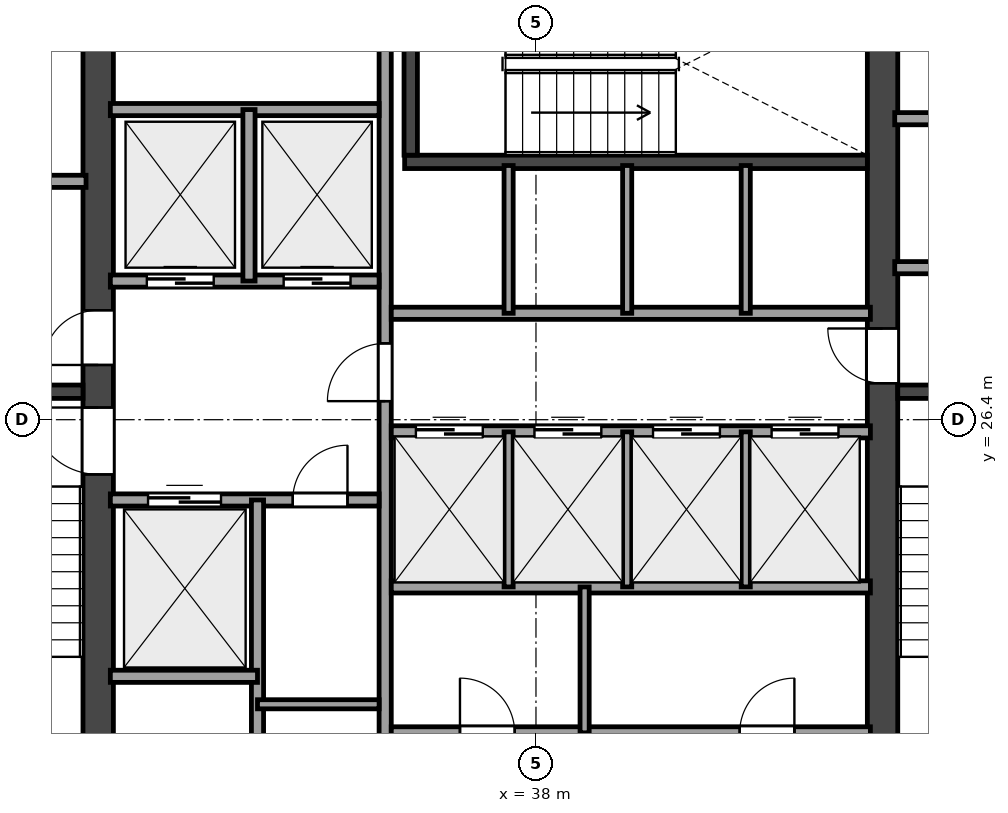
"""IFC4 building model, lengths in metres.
Left out: names, types, materials, properties, quantities, classifications, styles, units other than length and angle.
Written with IfcOpenShell. Run it as: python <this file> out.ifc"""

import sys

from ifc_helpers import new_model, si_unit, direction, frame, frame_2d, origin, place, context, subcontext, project, spatial, rectangle, extrude, element, fill, save


model = new_model("IFC4")
c1 = context("Model", 3, precision=1e-05, world=origin(), true_north=direction((0.0, 1.0)))
c2 = subcontext(c1, "Body", "Model", "MODEL_VIEW")
j1 = project(units=[si_unit("LENGTHUNIT", "METRE"), si_unit("PLANEANGLEUNIT", "RADIAN")], contexts=[c1])
p1 = place(None, origin())
s1 = spatial("IfcSite", under=j1, at=p1, CompositionType="ELEMENT")
p2 = place(p1, origin())
s2 = spatial("IfcBuilding", under=s1, at=p2, CompositionType="ELEMENT")
p3 = place(p2, frame((0.0, 0.0, 180.6)))
s3 = spatial("IfcBuildingStorey", under=s2, at=p3, CompositionType="ELEMENT", Elevation=180.6)
p4 = place(p3, frame((30.8, 18.875, 0.0), z_axis=(0.0, 0.0, 1.0), x_axis=(0.0, 1.0, 0.0)))
e1 = element("IfcWall", 1, at=p4, inside=s3, PredefinedType="SHEAR", context=c2, shape_type="SweptSolid", body=[
    extrude(rectangle(XDim=15.05, YDim=0.5, at=frame_2d((7.525, 0.0))), origin(), (0.0, 0.0, 1.0), 3.32),
])
p5 = place(p4, frame((6.625, 0.0, 0.0)))
e2 = element("IfcOpeningElement", 2, at=p5, cuts=e1, PredefinedType="OPENING", context=c2, shape_type="SweptSolid", body=[
    extrude(rectangle(XDim=1.1, YDim=2.15, at=frame_2d((0.55, 1.075))), frame((0.0, 0.26, 0.0), z_axis=(0.0, -1.0, 0.0), x_axis=(1.0, 0.0, 0.0)), (0.0, 0.0, 1.0), 0.52),
])
p6 = place(p4, frame((8.425, 0.0, 0.0)))
e3 = element("IfcOpeningElement", 3, at=p6, cuts=e1, PredefinedType="OPENING", context=c2, shape_type="SweptSolid", body=[
    extrude(rectangle(XDim=0.9, YDim=2.1, at=frame_2d((0.45, 1.05))), frame((0.0, 0.26, 0.0), z_axis=(0.0, -1.0, 0.0), x_axis=(1.0, 0.0, 0.0)), (0.0, 0.0, 1.0), 0.52),
])
p7 = place(p3, frame((43.7, 18.875, 0.0), z_axis=(0.0, 0.0, 1.0), x_axis=(0.0, 1.0, 0.0)))
e4 = element("IfcWall", 4, at=p7, inside=s3, PredefinedType="SHEAR", context=c2, shape_type="SweptSolid", body=[
    extrude(rectangle(XDim=15.05, YDim=0.5, at=frame_2d((7.525, 0.0))), origin(), (0.0, 0.0, 1.0), 3.32),
])
p8 = place(p7, frame((8.125, 0.0, 0.0)))
e5 = element("IfcOpeningElement", 5, at=p8, cuts=e4, PredefinedType="OPENING", context=c2, shape_type="SweptSolid", body=[
    extrude(rectangle(XDim=0.9, YDim=2.1, at=frame_2d((0.45, 1.05))), frame((0.0, 0.26, 0.0), z_axis=(0.0, -1.0, 0.0), x_axis=(1.0, 0.0, 0.0)), (0.0, 0.0, 1.0), 0.52),
])
p9 = place(p3, frame((27.075, 26.86, 0.0), z_axis=(0.0, 0.0, 1.0), x_axis=(1.0, 0.0, 0.0)))
e6 = element("IfcWall", 6, at=p9, inside=s3, PredefinedType="SHEAR", context=c2, shape_type="SweptSolid", body=[
    extrude(rectangle(XDim=3.475, YDim=0.22, at=frame_2d((1.738, 0.0))), origin(), (0.0, 0.0, 1.0), 3.32),
])
p10 = place(p3, frame((43.95, 26.86, 0.0), z_axis=(0.0, 0.0, 1.0), x_axis=(1.0, 0.0, 0.0)))
e7 = element("IfcWall", 7, at=p10, inside=s3, PredefinedType="SHEAR", context=c2, shape_type="SweptSolid", body=[
    extrude(rectangle(XDim=3.375, YDim=0.22, at=frame_2d((1.688, 0.0))), origin(), (0.0, 0.0, 1.0), 3.32),
])
p11 = place(p3, frame((35.84, 30.64, 0.0), z_axis=(0.0, 0.0, 1.0), x_axis=(1.0, 0.0, 0.0)))
e8 = element("IfcWall", 8, at=p11, inside=s3, PredefinedType="SHEAR", context=c2, shape_type="SweptSolid", body=[
    extrude(rectangle(XDim=7.61, YDim=0.22, at=frame_2d((3.805, 0.0))), origin(), (0.0, 0.0, 1.0), 3.32),
])
p12 = place(p3, frame((35.94, 30.75, 0.0), z_axis=(0.0, 0.0, 1.0), x_axis=(0.0, 1.0, 0.0)))
e9 = element("IfcWall", 9, at=p12, inside=s3, PredefinedType="SHEAR", context=c2, shape_type="SweptSolid", body=[
    extrude(rectangle(XDim=3.175, YDim=0.22, at=frame_2d((1.587, 0.0))), origin(), (0.0, 0.0, 1.0), 3.32),
])
p13 = place(p3, frame((27.15, 30.32, 0.0), z_axis=(0.0, 0.0, 1.0), x_axis=(1.0, 0.0, 0.0)))
e10 = element("IfcWall", 10, at=p13, inside=s3, PredefinedType="SOLIDWALL", context=c2, shape_type="SweptSolid", body=[
    extrude(rectangle(XDim=3.45, YDim=0.2, at=frame_2d((1.725, 0.0))), origin(), (0.0, 0.0, 1.0), 3.32),
])
p14 = place(p3, frame((43.9, 28.9, 0.0), z_axis=(0.0, 0.0, 1.0), x_axis=(1.0, 0.0, 0.0)))
e11 = element("IfcWall", 11, at=p14, inside=s3, PredefinedType="SOLIDWALL", context=c2, shape_type="SweptSolid", body=[
    extrude(rectangle(XDim=3.35, YDim=0.2, at=frame_2d((1.675, 0.0))), origin(), (0.0, 0.0, 1.0), 3.32),
])
p15 = place(p14, frame((1.15, 0.0, 0.0)))
e12 = element("IfcOpeningElement", 12, at=p15, cuts=e11, PredefinedType="OPENING", context=c2, shape_type="SweptSolid", body=[
    extrude(rectangle(XDim=0.9, YDim=2.1, at=frame_2d((0.45, 1.05))), frame((0.0, 0.11, 0.0), z_axis=(0.0, -1.0, 0.0), x_axis=(1.0, 0.0, 0.0)), (0.0, 0.0, 1.0), 0.22),
])
p16 = place(p3, frame((43.9, 31.35, 0.0), z_axis=(0.0, 0.0, 1.0), x_axis=(1.0, 0.0, 0.0)))
e13 = element("IfcWall", 13, at=p16, inside=s3, PredefinedType="SOLIDWALL", context=c2, shape_type="SweptSolid", body=[
    extrude(rectangle(XDim=3.35, YDim=0.2, at=frame_2d((1.675, 0.0))), origin(), (0.0, 0.0, 1.0), 2.949),
])
p17 = place(p3, frame((35.52, 18.95, 0.0), z_axis=(0.0, 0.0, 1.0), x_axis=(0.0, 1.0, 0.0)))
e14 = element("IfcWall", 14, at=p17, inside=s3, PredefinedType="SOLIDWALL", context=c2, shape_type="SweptSolid", body=[
    extrude(rectangle(XDim=14.9, YDim=0.2, at=frame_2d((7.45, 0.0))), origin(), (0.0, 0.0, 1.0), 2.841),
])
p18 = place(p17, frame((7.755, 0.0, 0.0)))
e15 = element("IfcOpeningElement", 15, at=p18, cuts=e14, PredefinedType="OPENING", context=c2, shape_type="SweptSolid", body=[
    extrude(rectangle(XDim=0.95, YDim=2.15, at=frame_2d((0.475, 1.075))), frame((0.0, 0.11, 0.0), z_axis=(0.0, -1.0, 0.0), x_axis=(1.0, 0.0, 0.0)), (0.0, 0.0, 1.0), 0.22),
])
p19 = place(p17, frame((0.6, 0.0, 0.0)))
e16 = element("IfcOpeningElement", 16, at=p19, cuts=e14, PredefinedType="OPENING", context=c2, shape_type="SweptSolid", body=[
    extrude(rectangle(XDim=0.9, YDim=2.1, at=frame_2d((0.45, 1.05))), frame((0.0, 0.11, 0.0), z_axis=(0.0, -1.0, 0.0), x_axis=(1.0, 0.0, 0.0)), (0.0, 0.0, 1.0), 0.22),
])
p20 = place(p3, frame((31.0, 28.68, 0.0), z_axis=(0.0, 0.0, 1.0), x_axis=(1.0, 0.0, 0.0)))
e17 = element("IfcWall", 17, at=p20, inside=s3, PredefinedType="SOLIDWALL", context=c2, shape_type="SweptSolid", body=[
    extrude(rectangle(XDim=4.42, YDim=0.2, at=frame_2d((2.21, 0.0))), origin(), (0.0, 0.0, 1.0), 3.32),
])
p21 = place(p20, frame((0.6, 0.0, 0.0)))
e18 = element("IfcOpeningElement", 18, at=p21, cuts=e17, PredefinedType="OPENING", context=c2, shape_type="SweptSolid", body=[
    extrude(rectangle(XDim=1.1, YDim=2.15, at=frame_2d((0.55, 1.075))), frame((0.0, 0.11, 0.0), z_axis=(0.0, -1.0, 0.0), x_axis=(1.0, 0.0, 0.0)), (0.0, 0.0, 1.0), 0.22),
])
p22 = place(p20, frame((2.85, 0.0, 0.0)))
e19 = element("IfcOpeningElement", 19, at=p22, cuts=e17, PredefinedType="OPENING", context=c2, shape_type="SweptSolid", body=[
    extrude(rectangle(XDim=1.1, YDim=2.15, at=frame_2d((0.55, 1.075))), frame((0.0, 0.11, 0.0), z_axis=(0.0, -1.0, 0.0), x_axis=(1.0, 0.0, 0.0)), (0.0, 0.0, 1.0), 0.22),
])
p23 = place(p3, frame((31.0, 31.5, 0.0), z_axis=(0.0, 0.0, 1.0), x_axis=(1.0, 0.0, 0.0)))
e20 = element("IfcWall", 20, at=p23, inside=s3, PredefinedType="SOLIDWALL", context=c2, shape_type="SweptSolid", body=[
    extrude(rectangle(XDim=4.42, YDim=0.2, at=frame_2d((2.21, 0.0))), origin(), (0.0, 0.0, 1.0), 3.32),
])
p24 = place(p3, frame((33.28, 28.68, 0.0), z_axis=(0.0, 0.0, 1.0), x_axis=(0.0, 1.0, 0.0)))
e21 = element("IfcWall", 21, at=p24, inside=s3, PredefinedType="SOLIDWALL", context=c2, shape_type="SweptSolid", body=[
    extrude(rectangle(XDim=2.82, YDim=0.2, at=frame_2d((1.41, 0.0))), origin(), (0.0, 0.0, 1.0), 3.32),
])
p25 = place(p3, frame((31.0, 25.08, 0.0), z_axis=(0.0, 0.0, 1.0), x_axis=(1.0, 0.0, 0.0)))
e22 = element("IfcWall", 22, at=p25, inside=s3, PredefinedType="SOLIDWALL", context=c2, shape_type="SweptSolid", body=[
    extrude(rectangle(XDim=4.42, YDim=0.2, at=frame_2d((2.21, 0.0))), origin(), (0.0, 0.0, 1.0), 3.32),
])
p26 = place(p25, frame((3.0, 0.0, 0.0)))
e23 = element("IfcOpeningElement", 23, at=p26, cuts=e22, PredefinedType="OPENING", context=c2, shape_type="SweptSolid", body=[
    extrude(rectangle(XDim=0.9, YDim=2.1, at=frame_2d((0.45, 1.05))), frame((0.0, 0.11, 0.0), z_axis=(0.0, -1.0, 0.0), x_axis=(1.0, 0.0, 0.0)), (0.0, 0.0, 1.0), 0.22),
])
p27 = place(p25, frame((0.62, 0.0, 0.0)))
e24 = element("IfcOpeningElement", 24, at=p27, cuts=e22, PredefinedType="OPENING", context=c2, shape_type="SweptSolid", body=[
    extrude(rectangle(XDim=1.2, YDim=2.15, at=frame_2d((0.6, 1.075))), frame((0.0, 0.11, 0.0), z_axis=(0.0, -1.0, 0.0), x_axis=(1.0, 0.0, 0.0)), (0.0, 0.0, 1.0), 0.22),
])
p28 = place(p3, frame((33.42, 18.95, 0.0), z_axis=(0.0, 0.0, 1.0), x_axis=(0.0, 1.0, 0.0)))
e25 = element("IfcWall", 25, at=p28, inside=s3, PredefinedType="SOLIDWALL", context=c2, shape_type="SweptSolid", body=[
    extrude(rectangle(XDim=6.13, YDim=0.2, at=frame_2d((3.065, 0.0))), origin(), (0.0, 0.0, 1.0), 2.841),
])
p29 = place(p3, frame((31.0, 22.18, 0.0), z_axis=(0.0, 0.0, 1.0), x_axis=(1.0, 0.0, 0.0)))
e26 = element("IfcWall", 26, at=p29, inside=s3, PredefinedType="SOLIDWALL", context=c2, shape_type="SweptSolid", body=[
    extrude(rectangle(XDim=2.42, YDim=0.2, at=frame_2d((1.21, 0.0))), origin(), (0.0, 0.0, 1.0), 3.32),
])
p30 = place(p3, frame((33.42, 21.72, 0.0), z_axis=(0.0, 0.0, 1.0), x_axis=(1.0, 0.0, 0.0)))
e27 = element("IfcWall", 27, at=p30, inside=s3, PredefinedType="PARTITIONING", context=c2, shape_type="SweptSolid", body=[
    extrude(rectangle(XDim=2.0, YDim=0.15, at=frame_2d((1.0, 0.0))), origin(), (0.0, 0.0, 1.0), 3.32),
])
p31 = place(p3, frame((35.62, 28.15, 0.0), z_axis=(0.0, 0.0, 1.0), x_axis=(1.0, 0.0, 0.0)))
e28 = element("IfcWall", 28, at=p31, inside=s3, PredefinedType="SOLIDWALL", context=c2, shape_type="SweptSolid", body=[
    extrude(rectangle(XDim=7.88, YDim=0.2, at=frame_2d((3.94, 0.0))), origin(), (0.0, 0.0, 1.0), 3.32),
])
p32 = place(p3, frame((35.62, 26.2, 0.0), z_axis=(0.0, 0.0, 1.0), x_axis=(1.0, 0.0, 0.0)))
e29 = element("IfcWall", 29, at=p32, inside=s3, PredefinedType="SOLIDWALL", context=c2, shape_type="SweptSolid", body=[
    extrude(rectangle(XDim=7.88, YDim=0.2, at=frame_2d((3.94, 0.0))), origin(), (0.0, 0.0, 1.0), 3.32),
])
p33 = place(p32, frame((0.405, 0.0, 0.0)))
e30 = element("IfcOpeningElement", 30, at=p33, cuts=e29, PredefinedType="OPENING", context=c2, shape_type="SweptSolid", body=[
    extrude(rectangle(XDim=1.1, YDim=2.15, at=frame_2d((0.55, 1.075))), frame((0.0, 0.11, 0.0), z_axis=(0.0, -1.0, 0.0), x_axis=(1.0, 0.0, 0.0)), (0.0, 0.0, 1.0), 0.22),
])
p34 = place(p32, frame((2.355, 0.0, 0.0)))
e31 = element("IfcOpeningElement", 31, at=p34, cuts=e29, PredefinedType="OPENING", context=c2, shape_type="SweptSolid", body=[
    extrude(rectangle(XDim=1.1, YDim=2.15, at=frame_2d((0.55, 1.075))), frame((0.0, 0.11, 0.0), z_axis=(0.0, -1.0, 0.0), x_axis=(1.0, 0.0, 0.0)), (0.0, 0.0, 1.0), 0.22),
])
p35 = place(p32, frame((4.305, 0.0, 0.0)))
e32 = element("IfcOpeningElement", 32, at=p35, cuts=e29, PredefinedType="OPENING", context=c2, shape_type="SweptSolid", body=[
    extrude(rectangle(XDim=1.1, YDim=2.15, at=frame_2d((0.55, 1.075))), frame((0.0, 0.11, 0.0), z_axis=(0.0, -1.0, 0.0), x_axis=(1.0, 0.0, 0.0)), (0.0, 0.0, 1.0), 0.22),
])
p36 = place(p32, frame((6.255, 0.0, 0.0)))
e33 = element("IfcOpeningElement", 33, at=p36, cuts=e29, PredefinedType="OPENING", context=c2, shape_type="SweptSolid", body=[
    extrude(rectangle(XDim=1.1, YDim=2.15, at=frame_2d((0.55, 1.075))), frame((0.0, 0.11, 0.0), z_axis=(0.0, -1.0, 0.0), x_axis=(1.0, 0.0, 0.0)), (0.0, 0.0, 1.0), 0.22),
])
p37 = place(p3, frame((35.62, 23.65, 0.0), z_axis=(0.0, 0.0, 1.0), x_axis=(1.0, 0.0, 0.0)))
e34 = element("IfcWall", 34, at=p37, inside=s3, PredefinedType="SOLIDWALL", context=c2, shape_type="SweptSolid", body=[
    extrude(rectangle(XDim=7.88, YDim=0.2, at=frame_2d((3.94, 0.0))), origin(), (0.0, 0.0, 1.0), 2.841),
])
p38 = place(p3, frame((35.62, 21.25, 0.0), z_axis=(0.0, 0.0, 1.0), x_axis=(1.0, 0.0, 0.0)))
e35 = element("IfcWall", 35, at=p38, inside=s3, PredefinedType="SOLIDWALL", context=c2, shape_type="SweptSolid", body=[
    extrude(rectangle(XDim=7.88, YDim=0.2, at=frame_2d((3.94, 0.0))), origin(), (0.0, 0.0, 1.0), 3.32),
])
p39 = place(p38, frame((1.13, 0.0, 0.0)))
e36 = element("IfcOpeningElement", 36, at=p39, cuts=e35, PredefinedType="OPENING", context=c2, shape_type="SweptSolid", body=[
    extrude(rectangle(XDim=0.9, YDim=2.1, at=frame_2d((0.45, 1.05))), frame((0.0, 0.11, 0.0), z_axis=(0.0, -1.0, 0.0), x_axis=(1.0, 0.0, 0.0)), (0.0, 0.0, 1.0), 0.22),
])
p40 = place(p38, frame((5.73, 0.0, 0.0)))
e37 = element("IfcOpeningElement", 37, at=p40, cuts=e35, PredefinedType="OPENING", context=c2, shape_type="SweptSolid", body=[
    extrude(rectangle(XDim=0.9, YDim=2.1, at=frame_2d((0.45, 1.05))), frame((0.0, 0.11, 0.0), z_axis=(0.0, -1.0, 0.0), x_axis=(1.0, 0.0, 0.0)), (0.0, 0.0, 1.0), 0.22),
])
for number, where, z_axis, x_axis in (
    (38, (37.55, 28.15, 0.0), (0.0, 0.0, 1.0), (0.0, 1.0, 0.0)),
    (39, (39.5, 28.15, 0.0), (0.0, 0.0, 1.0), (0.0, 1.0, 0.0)),
    (40, (41.45, 28.15, 0.0), (0.0, 0.0, 1.0), (0.0, 1.0, 0.0)),
):
    element("IfcWall", number, at=place(p3, frame(where, z_axis=z_axis, x_axis=x_axis)), inside=s3, PredefinedType="PARTITIONING", context=c2, shape_type="SweptSolid", body=[
        extrude(rectangle(XDim=2.43, YDim=0.15, at=frame_2d((1.215, 0.0))), origin(), (0.0, 0.0, 1.0), 3.32),
    ])
for number, where, z_axis, x_axis in (
    (41, (37.55, 23.65, 0.0), (0.0, 0.0, 1.0), (0.0, 1.0, 0.0)),
    (42, (39.5, 23.65, 0.0), (0.0, 0.0, 1.0), (0.0, 1.0, 0.0)),
    (43, (41.45, 23.65, 0.0), (0.0, 0.0, 1.0), (0.0, 1.0, 0.0)),
):
    element("IfcWall", number, at=place(p3, frame(where, z_axis=z_axis, x_axis=x_axis)), inside=s3, PredefinedType="PARTITIONING", context=c2, shape_type="SweptSolid", body=[
        extrude(rectangle(XDim=2.55, YDim=0.15, at=frame_2d((1.275, 0.0))), origin(), (0.0, 0.0, 1.0), 2.841),
    ])
p41 = place(p3, frame((38.8, 21.25, 0.0), z_axis=(0.0, 0.0, 1.0), x_axis=(0.0, 1.0, 0.0)))
e44 = element("IfcWall", 44, at=p41, inside=s3, PredefinedType="PARTITIONING", context=c2, shape_type="SweptSolid", body=[
    extrude(rectangle(XDim=2.4, YDim=0.15, at=frame_2d((1.2, 0.0))), origin(), (0.0, 0.0, 1.0), 2.841),
])
p42 = place(p5, origin())
e45 = element("IfcDoor", 45, at=p42, inside=s3, OperationType="SINGLE_SWING_RIGHT", PredefinedType="DOOR", context=c2, shape_type="SweptSolid", body=[
    extrude(rectangle(XDim=1.1, YDim=2.15, at=frame_2d((0.55, 1.075))), frame((0.0, 0.025, 0.0), z_axis=(0.0, -1.0, 0.0), x_axis=(1.0, 0.0, 0.0)), (0.0, 0.0, 1.0), 0.05),
])
fill(e2, e45)
p43 = place(p18, origin())
e46 = element("IfcDoor", 46, at=p43, inside=s3, OperationType="SINGLE_SWING_LEFT", PredefinedType="DOOR", context=c2, shape_type="SweptSolid", body=[
    extrude(rectangle(XDim=0.95, YDim=2.15, at=frame_2d((0.475, 1.075))), frame((0.0, 0.025, 0.0), z_axis=(0.0, -1.0, 0.0), x_axis=(1.0, 0.0, 0.0)), (0.0, 0.0, 1.0), 0.05),
])
fill(e15, e46)
p44 = place(p8, origin())
e47 = element("IfcDoor", 47, at=p44, inside=s3, OperationType="SINGLE_SWING_RIGHT", PredefinedType="DOOR", context=c2, shape_type="SweptSolid", body=[
    extrude(rectangle(XDim=0.9, YDim=2.1, at=frame_2d((0.45, 1.05))), frame((0.0, 0.025, 0.0), z_axis=(0.0, -1.0, 0.0), x_axis=(1.0, 0.0, 0.0)), (0.0, 0.0, 1.0), 0.05),
])
fill(e5, e47)
p45 = place(p6, origin())
e48 = element("IfcDoor", 48, at=p45, inside=s3, OperationType="SINGLE_SWING_LEFT", PredefinedType="DOOR", context=c2, shape_type="SweptSolid", body=[
    extrude(rectangle(XDim=0.9, YDim=2.1, at=frame_2d((0.45, 1.05))), frame((0.0, 0.025, 0.0), z_axis=(0.0, -1.0, 0.0), x_axis=(1.0, 0.0, 0.0)), (0.0, 0.0, 1.0), 0.05),
])
fill(e3, e48)
p46 = place(p26, origin())
e49 = element("IfcDoor", 49, at=p46, inside=s3, OperationType="SINGLE_SWING_RIGHT", PredefinedType="DOOR", context=c2, shape_type="SweptSolid", body=[
    extrude(rectangle(XDim=0.9, YDim=2.1, at=frame_2d((0.45, 1.05))), frame((0.0, 0.025, 0.0), z_axis=(0.0, -1.0, 0.0), x_axis=(1.0, 0.0, 0.0)), (0.0, 0.0, 1.0), 0.05),
])
fill(e23, e49)
p47 = place(p39, origin())
e50 = element("IfcDoor", 50, at=p47, inside=s3, OperationType="SINGLE_SWING_LEFT", PredefinedType="DOOR", context=c2, shape_type="SweptSolid", body=[
    extrude(rectangle(XDim=0.9, YDim=2.1, at=frame_2d((0.45, 1.05))), frame((0.0, 0.025, 0.0), z_axis=(0.0, -1.0, 0.0), x_axis=(1.0, 0.0, 0.0)), (0.0, 0.0, 1.0), 0.05),
])
fill(e36, e50)
p48 = place(p40, origin())
e51 = element("IfcDoor", 51, at=p48, inside=s3, OperationType="SINGLE_SWING_RIGHT", PredefinedType="DOOR", context=c2, shape_type="SweptSolid", body=[
    extrude(rectangle(XDim=0.9, YDim=2.1, at=frame_2d((0.45, 1.05))), frame((0.0, 0.025, 0.0), z_axis=(0.0, -1.0, 0.0), x_axis=(1.0, 0.0, 0.0)), (0.0, 0.0, 1.0), 0.05),
])
fill(e37, e51)
p49 = place(p21, origin())
e52 = element("IfcDoor", 52, at=p49, inside=s3, OperationType="SLIDING_TO_LEFT", PredefinedType="DOOR", context=c2, shape_type="SweptSolid", body=[
    extrude(rectangle(XDim=1.1, YDim=2.15, at=frame_2d((0.55, 1.075))), frame((0.0, 0.025, 0.0), z_axis=(0.0, -1.0, 0.0), x_axis=(1.0, 0.0, 0.0)), (0.0, 0.0, 1.0), 0.05),
])
fill(e18, e52)
p50 = place(p22, origin())
e53 = element("IfcDoor", 53, at=p50, inside=s3, OperationType="SLIDING_TO_LEFT", PredefinedType="DOOR", context=c2, shape_type="SweptSolid", body=[
    extrude(rectangle(XDim=1.1, YDim=2.15, at=frame_2d((0.55, 1.075))), frame((0.0, 0.025, 0.0), z_axis=(0.0, -1.0, 0.0), x_axis=(1.0, 0.0, 0.0)), (0.0, 0.0, 1.0), 0.05),
])
fill(e19, e53)
p51 = place(p27, origin())
e54 = element("IfcDoor", 54, at=p51, inside=s3, OperationType="SLIDING_TO_LEFT", PredefinedType="DOOR", context=c2, shape_type="SweptSolid", body=[
    extrude(rectangle(XDim=1.2, YDim=2.15, at=frame_2d((0.6, 1.075))), frame((0.0, 0.025, 0.0), z_axis=(0.0, -1.0, 0.0), x_axis=(1.0, 0.0, 0.0)), (0.0, 0.0, 1.0), 0.05),
])
fill(e24, e54)
p52 = place(p33, origin())
e55 = element("IfcDoor", 55, at=p52, inside=s3, OperationType="SLIDING_TO_LEFT", PredefinedType="DOOR", context=c2, shape_type="SweptSolid", body=[
    extrude(rectangle(XDim=1.1, YDim=2.15, at=frame_2d((0.55, 1.075))), frame((0.0, 0.025, 0.0), z_axis=(0.0, -1.0, 0.0), x_axis=(1.0, 0.0, 0.0)), (0.0, 0.0, 1.0), 0.05),
])
fill(e30, e55)
p53 = place(p34, origin())
e56 = element("IfcDoor", 56, at=p53, inside=s3, OperationType="SLIDING_TO_LEFT", PredefinedType="DOOR", context=c2, shape_type="SweptSolid", body=[
    extrude(rectangle(XDim=1.1, YDim=2.15, at=frame_2d((0.55, 1.075))), frame((0.0, 0.025, 0.0), z_axis=(0.0, -1.0, 0.0), x_axis=(1.0, 0.0, 0.0)), (0.0, 0.0, 1.0), 0.05),
])
fill(e31, e56)
p54 = place(p35, origin())
e57 = element("IfcDoor", 57, at=p54, inside=s3, OperationType="SLIDING_TO_LEFT", PredefinedType="DOOR", context=c2, shape_type="SweptSolid", body=[
    extrude(rectangle(XDim=1.1, YDim=2.15, at=frame_2d((0.55, 1.075))), frame((0.0, 0.025, 0.0), z_axis=(0.0, -1.0, 0.0), x_axis=(1.0, 0.0, 0.0)), (0.0, 0.0, 1.0), 0.05),
])
fill(e32, e57)
p55 = place(p36, origin())
e58 = element("IfcDoor", 58, at=p55, inside=s3, OperationType="SLIDING_TO_LEFT", PredefinedType="DOOR", context=c2, shape_type="SweptSolid", body=[
    extrude(rectangle(XDim=1.1, YDim=2.15, at=frame_2d((0.55, 1.075))), frame((0.0, 0.025, 0.0), z_axis=(0.0, -1.0, 0.0), x_axis=(1.0, 0.0, 0.0)), (0.0, 0.0, 1.0), 0.05),
])
fill(e33, e58)
save(model, sys.argv[1])
